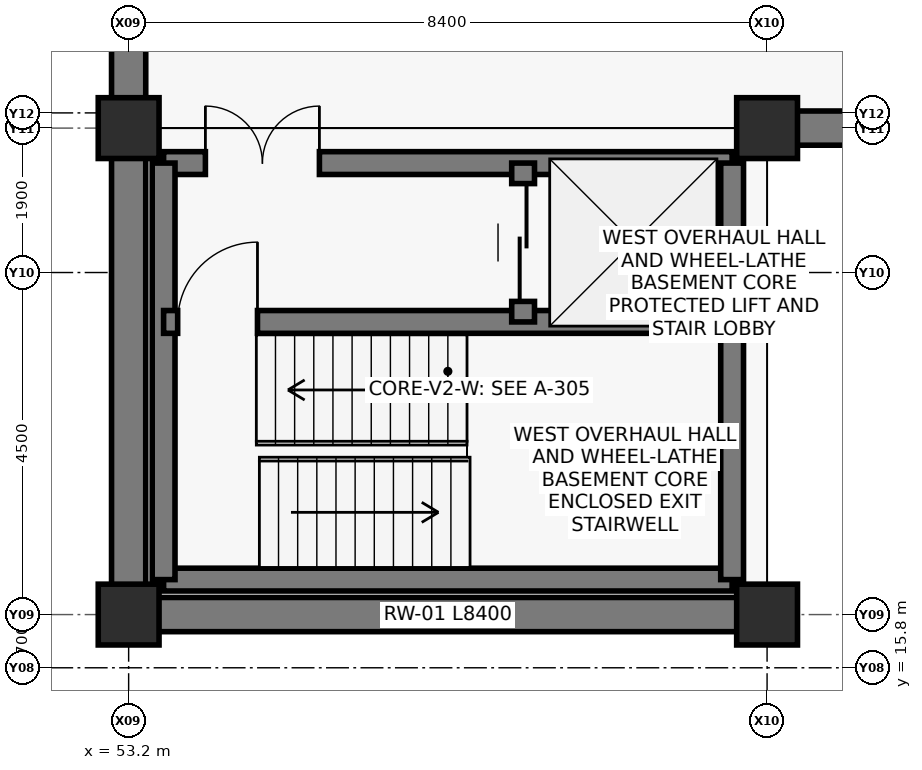
"""IFC4 building model, lengths in metres.
Left out: names, types, materials, properties, quantities, classifications, styles, units other than length and angle.
Written with IfcOpenShell. Run it as: python <this file> out.ifc"""

import sys

from ifc_helpers import new_model, si_unit, direction, frame, frame_2d, origin, origin_2d, place, context, subcontext, project, spatial, rectangle, extrude, element, fill, save


model = new_model("IFC4")
c1 = context("Model", 3, precision=1e-05, world=origin(), true_north=direction((0.0, 1.0)))
c2 = subcontext(c1, "Body", "Model", "MODEL_VIEW")
j1 = project(units=[si_unit("LENGTHUNIT", "METRE"), si_unit("PLANEANGLEUNIT", "RADIAN")], contexts=[c1])
p1 = place(None, origin())
s1 = spatial("IfcSite", under=j1, at=p1, CompositionType="ELEMENT")
p2 = place(p1, origin())
s2 = spatial("IfcBuilding", under=s1, at=p2, CompositionType="ELEMENT")
p3 = place(p2, frame((0.0, 0.0, -4.0)))
s3 = spatial("IfcBuildingStorey", under=s2, at=p3, CompositionType="ELEMENT", Elevation=-4.0)
for number, where, z_axis, x_axis in (
    (1, (53.2, 16.5, -0.6), (0.0, 0.0, 1.0), (1.0, 0.0, 0.0)),
    (2, (53.2, 22.9, -0.6), (0.0, 0.0, 1.0), (1.0, 0.0, 0.0)),
    (3, (61.6, 16.5, -0.6), (0.0, 0.0, 1.0), (1.0, 0.0, 0.0)),
    (4, (61.6, 22.9, -0.6), (0.0, 0.0, 1.0), (1.0, 0.0, 0.0)),
):
    element("IfcColumn", number, at=place(p3, frame(where, z_axis=z_axis, x_axis=x_axis)), inside=s3, PredefinedType="COLUMN", context=c2, shape_type="SweptSolid", body=[
        extrude(rectangle(XDim=0.8, YDim=0.8, at=origin_2d()), origin(), (0.0, 0.0, 1.0), 4.25),
    ])
p4 = place(p3, frame((61.6, 22.9, -0.6), z_axis=(0.0, 0.0, 1.0), x_axis=(1.0, 0.0, 0.0)))
e5 = element("IfcWall", 5, at=p4, inside=s3, PredefinedType="USERDEFINED", context=c2, shape_type="SweptSolid", body=[
    extrude(rectangle(XDim=33.6, YDim=0.45, at=frame_2d((16.8, 0.0))), origin(), (0.0, 0.0, 1.0), 4.25),
])
p5 = place(p3, frame((53.2, 16.5, -0.6), z_axis=(0.0, 0.0, 1.0), x_axis=(1.0, 0.0, 0.0)))
e6 = element("IfcWall", 6, at=p5, inside=s3, PredefinedType="USERDEFINED", context=c2, shape_type="SweptSolid", body=[
    extrude(rectangle(XDim=8.4, YDim=0.45, at=frame_2d((4.2, 0.0))), origin(), (0.0, 0.0, 1.0), 4.25),
])
p6 = place(p3, frame((53.2, 16.5, -0.6), z_axis=(0.0, 0.0, 1.0), x_axis=(0.0, 1.0, 0.0)))
e7 = element("IfcWall", 7, at=p6, inside=s3, PredefinedType="USERDEFINED", context=c2, shape_type="SweptSolid", body=[
    extrude(rectangle(XDim=19.2, YDim=0.45, at=frame_2d((9.6, 0.0))), origin(), (0.0, 0.0, 1.0), 4.25),
])
p7 = place(p3, frame((53.66, 16.96, -0.6), z_axis=(0.0, 0.0, 1.0), x_axis=(1.0, 0.0, 0.0)))
e8 = element("IfcWall", 8, at=p7, inside=s3, PredefinedType="SHEAR", context=c2, shape_type="SweptSolid", body=[
    extrude(rectangle(XDim=7.48, YDim=0.3, at=frame_2d((3.74, 0.0))), origin(), (0.0, 0.0, 1.0), 4.25),
])
p8 = place(p3, frame((53.66, 22.44, -0.6), z_axis=(0.0, 0.0, 1.0), x_axis=(1.0, 0.0, 0.0)))
e9 = element("IfcWall", 9, at=p8, inside=s3, PredefinedType="SHEAR", context=c2, shape_type="SweptSolid", body=[
    extrude(rectangle(XDim=7.48, YDim=0.3, at=frame_2d((3.74, 0.0))), origin(), (0.0, 0.0, 1.0), 4.25),
])
p9 = place(p8, frame((0.55, 0.0, 0.6)))
e10 = element("IfcOpeningElement", 10, at=p9, cuts=e9, PredefinedType="OPENING", context=c2, shape_type="SweptSolid", body=[
    extrude(rectangle(XDim=1.5, YDim=2.2, at=frame_2d((0.75, 1.1))), frame((0.0, 0.16, 0.0), z_axis=(0.0, -1.0, 0.0), x_axis=(1.0, 0.0, 0.0)), (0.0, 0.0, 1.0), 0.32),
])
for number, where, z_axis, x_axis in (
    (11, (53.66, 16.96, -0.6), (0.0, 0.0, 1.0), (0.0, 1.0, 0.0)),
    (12, (61.14, 16.96, -0.6), (0.0, 0.0, 1.0), (0.0, 1.0, 0.0)),
):
    element("IfcWall", number, at=place(p3, frame(where, z_axis=z_axis, x_axis=x_axis)), inside=s3, PredefinedType="SHEAR", context=c2, shape_type="SweptSolid", body=[
        extrude(rectangle(XDim=5.48, YDim=0.3, at=frame_2d((2.74, 0.0))), origin(), (0.0, 0.0, 1.0), 4.25),
    ])
p10 = place(p3, frame((53.66, 20.35, -0.6), z_axis=(0.0, 0.0, 1.0), x_axis=(1.0, 0.0, 0.0)))
e13 = element("IfcWall", 13, at=p10, inside=s3, PredefinedType="SHEAR", context=c2, shape_type="SweptSolid", body=[
    extrude(rectangle(XDim=7.48, YDim=0.3, at=frame_2d((3.74, 0.0))), origin(), (0.0, 0.0, 1.0), 4.25),
])
p11 = place(p10, frame((0.185, 0.0, 0.6)))
e14 = element("IfcOpeningElement", 14, at=p11, cuts=e13, PredefinedType="OPENING", context=c2, shape_type="SweptSolid", body=[
    extrude(rectangle(XDim=1.05, YDim=2.15, at=frame_2d((0.525, 1.075))), frame((0.0, 0.16, 0.0), z_axis=(0.0, -1.0, 0.0), x_axis=(1.0, 0.0, 0.0)), (0.0, 0.0, 1.0), 0.32),
])
p12 = place(p3, frame((58.39, 20.35, -0.6), z_axis=(0.0, 0.0, 1.0), x_axis=(0.0, 1.0, 0.0)))
e15 = element("IfcWall", 15, at=p12, inside=s3, PredefinedType="SHEAR", context=c2, shape_type="SweptSolid", body=[
    extrude(rectangle(XDim=2.09, YDim=0.3, at=frame_2d((1.045, 0.0))), origin(), (0.0, 0.0, 1.0), 4.25),
])
p13 = place(p12, frame((0.27, 0.0, 0.6)))
e16 = element("IfcOpeningElement", 16, at=p13, cuts=e15, PredefinedType="OPENING", context=c2, shape_type="SweptSolid", body=[
    extrude(rectangle(XDim=1.55, YDim=2.35, at=frame_2d((0.775, 1.175))), frame((0.0, 0.16, 0.0), z_axis=(0.0, -1.0, 0.0), x_axis=(1.0, 0.0, 0.0)), (0.0, 0.0, 1.0), 0.32),
])
p14 = place(p11, origin())
e17 = element("IfcDoor", 17, at=p14, inside=s3, OperationType="SINGLE_SWING_RIGHT", PredefinedType="DOOR", context=c2, shape_type="SweptSolid", body=[
    extrude(rectangle(XDim=1.05, YDim=2.15, at=frame_2d((0.525, 1.075))), frame((0.0, 0.025, 0.0), z_axis=(0.0, -1.0, 0.0), x_axis=(1.0, 0.0, 0.0)), (0.0, 0.0, 1.0), 0.05),
])
fill(e14, e17)
p15 = place(p9, origin())
e18 = element("IfcDoor", 18, at=p15, inside=s3, OperationType="DOUBLE_DOOR_SINGLE_SWING", PredefinedType="DOOR", context=c2, shape_type="SweptSolid", body=[
    extrude(rectangle(XDim=1.5, YDim=2.2, at=frame_2d((0.75, 1.1))), frame((0.0, 0.025, 0.0), z_axis=(0.0, -1.0, 0.0), x_axis=(1.0, 0.0, 0.0)), (0.0, 0.0, 1.0), 0.05),
])
fill(e10, e18)
p16 = place(p13, origin())
e19 = element("IfcDoor", 19, at=p16, inside=s3, OperationType="SLIDING_TO_RIGHT", PredefinedType="DOOR", context=c2, shape_type="SweptSolid", body=[
    extrude(rectangle(XDim=1.55, YDim=2.35, at=frame_2d((0.775, 1.175))), frame((0.0, 0.025, 0.0), z_axis=(0.0, -1.0, 0.0), x_axis=(1.0, 0.0, 0.0)), (0.0, 0.0, 1.0), 0.05),
])
fill(e16, e19)
save(model, sys.argv[1])
